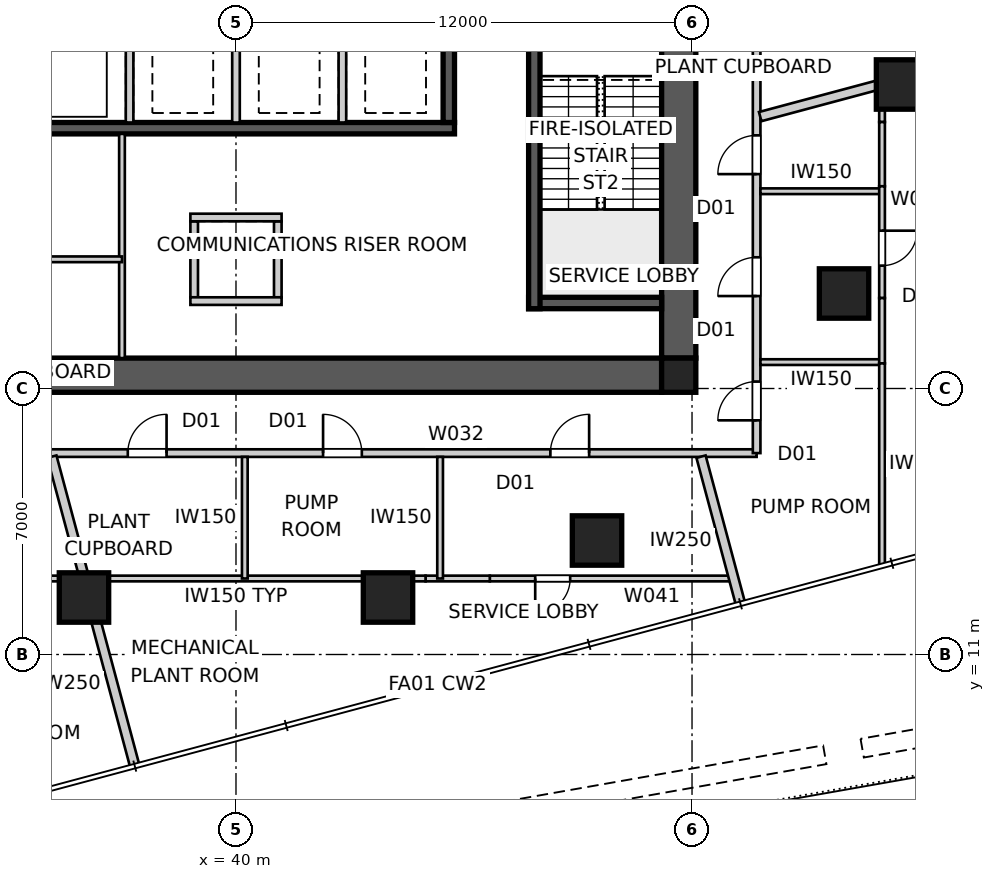
"""IFC4 building model, lengths in metres.
Left out: names, types, materials, properties, quantities, classifications, styles, units other than length and angle.
Written with IfcOpenShell. Run it as: python <this file> out.ifc"""

import sys

from ifc_helpers import new_model, si_unit, direction, frame, frame_2d, origin, origin_2d, place, context, subcontext, project, spatial, polyline, rectangle, outline, extrude, element, fill, save


model = new_model("IFC4")
c1 = context("Model", 3, precision=1e-05, world=origin(), true_north=direction((0.0, 1.0)))
c2 = subcontext(c1, "Body", "Model", "MODEL_VIEW")
j1 = project(units=[si_unit("LENGTHUNIT", "METRE"), si_unit("PLANEANGLEUNIT", "RADIAN")], contexts=[c1])
p1 = place(None, origin())
s1 = spatial("IfcSite", under=j1, at=p1, CompositionType="ELEMENT")
p2 = place(p1, origin())
s2 = spatial("IfcBuilding", under=s1, at=p2, CompositionType="ELEMENT")
p3 = place(p2, frame((0.0, 0.0, 106.6)))
s3 = spatial("IfcBuildingStorey", under=s2, at=p3, CompositionType="ELEMENT", Elevation=106.6)
p4 = place(p3, frame((51.2, 18.35, 0.0), z_axis=(0.0, 0.0, 1.0), x_axis=(-1.0, 0.0, 0.0)))
e1 = element("IfcWall", 1, at=p4, inside=s3, PredefinedType="SHEAR", context=c2, shape_type="SweptSolid", body=[
    extrude(outline(polyline([(0.0, -0.45), (22.4, -0.45), (22.4, -0.025), (22.85, -0.025), (22.85, 0.025), (22.4, 0.025), (22.4, 0.45), (0.0, 0.45), (0.0, 0.025), (-0.45, 0.025), (-0.45, -0.025), (0.0, -0.025), (0.0, -0.45)])), origin(), (0.0, 0.0, 1.0), 5.0),
])
p5 = place(p3, frame((51.65, 18.8, 0.0), z_axis=(0.0, 0.0, 1.0), x_axis=(0.0, 1.0, 0.0)))
e2 = element("IfcWall", 2, at=p5, inside=s3, PredefinedType="SHEAR", context=c2, shape_type="SweptSolid", body=[
    extrude(outline(polyline([(0.0, -0.45), (22.4, -0.45), (22.4, -0.025), (22.85, -0.025), (22.85, 0.025), (22.4, 0.025), (22.4, 0.45), (0.0, 0.45), (0.0, 0.025), (-0.45, 0.025), (-0.45, -0.025), (0.0, -0.025), (0.0, -0.45)])), origin(), (0.0, 0.0, 1.0), 5.0),
])
p6 = place(p5, frame((11.14, 0.0, 0.0)))
e3 = element("IfcOpeningElement", 3, at=p6, cuts=e2, PredefinedType="OPENING", context=c2, shape_type="SweptSolid", body=[
    extrude(rectangle(XDim=1.02, YDim=2.4, at=frame_2d((0.51, 1.2))), frame((0.0, 0.46, 0.0), z_axis=(0.0, -1.0, 0.0), x_axis=(1.0, 0.0, 0.0)), (0.0, 0.0, 1.0), 0.92),
])
p7 = place(p3, frame((45.75, 24.85, 0.0), z_axis=(0.0, 0.0, 1.0), x_axis=(-1.0, 0.0, 0.0)))
e4 = element("IfcWall", 4, at=p7, inside=s3, PredefinedType="SHEAR", context=c2, shape_type="SweptSolid", body=[
    extrude(rectangle(XDim=11.5, YDim=0.3, at=frame_2d((5.75, 0.0))), origin(), (0.0, 0.0, 1.0), 5.0),
])
p8 = place(p3, frame((45.6, 27.8, 0.0), z_axis=(0.0, 0.0, 1.0), x_axis=(0.0, -1.0, 0.0)))
e5 = element("IfcWall", 5, at=p8, inside=s3, PredefinedType="SHEAR", context=c2, shape_type="SweptSolid", body=[
    extrude(rectangle(XDim=2.8, YDim=0.3, at=frame_2d((1.4, 0.0))), origin(), (0.0, 0.0, 1.0), 5.0),
])
for number, where, z_axis, x_axis in (
    (6, (42.8, 27.8, 0.0), (0.0, 0.0, 1.0), (0.0, -1.0, 0.0)),
    (7, (40.0, 27.8, 0.0), (0.0, 0.0, 1.0), (0.0, -1.0, 0.0)),
    (8, (37.2, 27.8, 0.0), (0.0, 0.0, 1.0), (0.0, -1.0, 0.0)),
):
    element("IfcWall", number, at=place(p3, frame(where, z_axis=z_axis, x_axis=x_axis)), inside=s3, PredefinedType="SOLIDWALL", context=c2, shape_type="SweptSolid", body=[
        extrude(rectangle(XDim=2.8, YDim=0.2, at=frame_2d((1.4, 0.0))), origin(), (0.0, 0.0, 1.0), 5.0),
    ])
p9 = place(p3, frame((47.85, 27.8, 0.0), z_axis=(0.0, 0.0, 1.0), x_axis=(0.0, -1.0, 0.0)))
e9 = element("IfcWall", 9, at=p9, inside=s3, PredefinedType="SHEAR", context=c2, shape_type="SweptSolid", body=[
    extrude(rectangle(XDim=7.7, YDim=0.3, at=frame_2d((3.85, 0.0))), origin(), (0.0, 0.0, 1.0), 5.0),
])
p10 = place(p3, frame((51.2, 20.25, 0.0), z_axis=(0.0, 0.0, 1.0), x_axis=(-1.0, 0.0, 0.0)))
e10 = element("IfcWall", 10, at=p10, inside=s3, PredefinedType="SHEAR", context=c2, shape_type="SweptSolid", body=[
    extrude(rectangle(XDim=3.5, YDim=0.3, at=frame_2d((1.75, 0.0))), origin(), (0.0, 0.0, 1.0), 5.0),
])
for number, where, z_axis, x_axis in (
    (11, (38.9, 22.4, 0.0), (0.0, 0.0, 1.0), (0.0, -1.0, 0.0)),
    (12, (41.1, 22.4, 0.0), (0.0, 0.0, 1.0), (0.0, -1.0, 0.0)),
):
    element("IfcWall", number, at=place(p3, frame(where, z_axis=z_axis, x_axis=x_axis)), inside=s3, PredefinedType="SOLIDWALL", context=c2, shape_type="SweptSolid", body=[
        extrude(rectangle(XDim=2.0, YDim=0.2, at=frame_2d((1.0, 0.0))), origin(), (0.0, 0.0, 1.0), 5.0),
    ])
for number, where, z_axis, x_axis in (
    (13, (38.8, 22.5, 0.0), (0.0, 0.0, 1.0), (1.0, 0.0, 0.0)),
    (14, (38.8, 20.3, 0.0), (0.0, 0.0, 1.0), (1.0, 0.0, 0.0)),
):
    element("IfcWall", number, at=place(p3, frame(where, z_axis=z_axis, x_axis=x_axis)), inside=s3, PredefinedType="SOLIDWALL", context=c2, shape_type="SweptSolid", body=[
        extrude(rectangle(XDim=2.4, YDim=0.2, at=frame_2d((1.2, 0.0))), origin(), (0.0, 0.0, 1.0), 5.0),
    ])
p11 = place(p3, frame((51.65, 18.35, 0.0), z_axis=(0.0, 0.0, 1.0), x_axis=(1.0, 0.0, 0.0)))
e15 = element("IfcColumn", 15, at=p11, inside=s3, PredefinedType="COLUMN", context=c2, shape_type="SweptSolid", body=[
    extrude(rectangle(XDim=0.9, YDim=0.9, at=origin_2d()), origin(), (0.0, 0.0, 1.0), 5.0),
])
for number, where, z_axis, x_axis in (
    (16, (57.5, 26.0, 0.0), (0.0, 0.0, 1.0), (1.0, 0.0, 0.0)),
    (17, (36.0, 12.5, 0.0), (0.0, 0.0, 1.0), (1.0, 0.0, 0.0)),
    (18, (44.0, 12.5, 0.0), (0.0, 0.0, 1.0), (1.0, 0.0, 0.0)),
    (19, (49.5, 14.0, 0.0), (0.0, 0.0, 1.0), (1.0, 0.0, 0.0)),
    (20, (56.0, 20.5, 0.0), (0.0, 0.0, 1.0), (1.0, 0.0, 0.0)),
):
    element("IfcColumn", number, at=place(p3, frame(where, z_axis=z_axis, x_axis=x_axis)), inside=s3, PredefinedType="COLUMN", context=c2, shape_type="SweptSolid", body=[
        extrude(rectangle(XDim=1.3, YDim=1.3, at=origin_2d()), origin(), (0.0, 0.0, 1.0), 5.0),
    ])
p12 = place(p3, frame((26.3, 16.3, 0.0), z_axis=(0.0, 0.0, 1.0), x_axis=(1.0, 0.0, 0.0)))
e21 = element("IfcWall", 21, at=p12, inside=s3, PredefinedType="PARTITIONING", context=c2, shape_type="SweptSolid", body=[
    extrude(rectangle(XDim=27.4, YDim=0.2, at=frame_2d((13.7, 0.0))), origin(), (0.0, 0.0, 1.0), 4.85),
])
p13 = place(p12, frame((21.972, 0.0, 0.0)))
e22 = element("IfcOpeningElement", 22, at=p13, cuts=e21, PredefinedType="OPENING", context=c2, shape_type="SweptSolid", body=[
    extrude(rectangle(XDim=1.02, YDim=2.34, at=frame_2d((0.51, 1.17))), frame((0.0, 0.11, 0.0), z_axis=(0.0, -1.0, 0.0), x_axis=(1.0, 0.0, 0.0)), (0.0, 0.0, 1.0), 0.22),
])
p14 = place(p12, frame((15.991, 0.0, 0.0)))
e23 = element("IfcOpeningElement", 23, at=p14, cuts=e21, PredefinedType="OPENING", context=c2, shape_type="SweptSolid", body=[
    extrude(rectangle(XDim=1.02, YDim=2.34, at=frame_2d((0.51, 1.17))), frame((0.0, 0.11, 0.0), z_axis=(0.0, -1.0, 0.0), x_axis=(1.0, 0.0, 0.0)), (0.0, 0.0, 1.0), 0.22),
])
p15 = place(p12, frame((10.853, 0.0, 0.0)))
e24 = element("IfcOpeningElement", 24, at=p15, cuts=e21, PredefinedType="OPENING", context=c2, shape_type="SweptSolid", body=[
    extrude(rectangle(XDim=1.02, YDim=2.34, at=frame_2d((0.51, 1.17))), frame((0.0, 0.11, 0.0), z_axis=(0.0, -1.0, 0.0), x_axis=(1.0, 0.0, 0.0)), (0.0, 0.0, 1.0), 0.22),
])
p16 = place(p12, frame((4.133, 0.0, 0.0)))
e25 = element("IfcOpeningElement", 25, at=p16, cuts=e21, PredefinedType="OPENING", context=c2, shape_type="SweptSolid", body=[
    extrude(rectangle(XDim=1.02, YDim=2.34, at=frame_2d((0.51, 1.17))), frame((0.0, 0.11, 0.0), z_axis=(0.0, -1.0, 0.0), x_axis=(1.0, 0.0, 0.0)), (0.0, 0.0, 1.0), 0.22),
])
p17 = place(p12, frame((0.862, 0.0, 0.0)))
e26 = element("IfcOpeningElement", 26, at=p17, cuts=e21, PredefinedType="OPENING", context=c2, shape_type="SweptSolid", body=[
    extrude(rectangle(XDim=1.02, YDim=2.34, at=frame_2d((0.51, 1.17))), frame((0.0, 0.11, 0.0), z_axis=(0.0, -1.0, 0.0), x_axis=(1.0, 0.0, 0.0)), (0.0, 0.0, 1.0), 0.22),
])
p18 = place(p12, frame((7.342, 0.0, 0.0)))
e27 = element("IfcOpeningElement", 27, at=p18, cuts=e21, PredefinedType="OPENING", context=c2, shape_type="SweptSolid", body=[
    extrude(rectangle(XDim=1.02, YDim=2.34, at=frame_2d((0.51, 1.17))), frame((0.0, 0.11, 0.0), z_axis=(0.0, -1.0, 0.0), x_axis=(1.0, 0.0, 0.0)), (0.0, 0.0, 1.0), 0.22),
])
p19 = place(p3, frame((53.7, 16.3, 0.0), z_axis=(0.0, 0.0, 1.0), x_axis=(0.0, 1.0, 0.0)))
e28 = element("IfcWall", 28, at=p19, inside=s3, PredefinedType="PARTITIONING", context=c2, shape_type="SweptSolid", body=[
    extrude(rectangle(XDim=27.4, YDim=0.2, at=frame_2d((13.7, 0.0))), origin(), (0.0, 0.0, 1.0), 4.85),
])
p20 = place(p19, frame((21.421, 0.0, 0.0)))
e29 = element("IfcOpeningElement", 29, at=p20, cuts=e28, PredefinedType="OPENING", context=c2, shape_type="SweptSolid", body=[
    extrude(rectangle(XDim=1.02, YDim=2.34, at=frame_2d((0.51, 1.17))), frame((0.0, 0.11, 0.0), z_axis=(0.0, -1.0, 0.0), x_axis=(1.0, 0.0, 0.0)), (0.0, 0.0, 1.0), 0.22),
])
p21 = place(p19, frame((12.293, 0.0, 0.0)))
e30 = element("IfcOpeningElement", 30, at=p21, cuts=e28, PredefinedType="OPENING", context=c2, shape_type="SweptSolid", body=[
    extrude(rectangle(XDim=1.02, YDim=2.34, at=frame_2d((0.51, 1.17))), frame((0.0, 0.11, 0.0), z_axis=(0.0, -1.0, 0.0), x_axis=(1.0, 0.0, 0.0)), (0.0, 0.0, 1.0), 0.22),
])
p22 = place(p19, frame((4.133, 0.0, 0.0)))
e31 = element("IfcOpeningElement", 31, at=p22, cuts=e28, PredefinedType="OPENING", context=c2, shape_type="SweptSolid", body=[
    extrude(rectangle(XDim=1.02, YDim=2.34, at=frame_2d((0.51, 1.17))), frame((0.0, 0.11, 0.0), z_axis=(0.0, -1.0, 0.0), x_axis=(1.0, 0.0, 0.0)), (0.0, 0.0, 1.0), 0.22),
])
p23 = place(p19, frame((0.862, 0.0, 0.0)))
e32 = element("IfcOpeningElement", 32, at=p23, cuts=e28, PredefinedType="OPENING", context=c2, shape_type="SweptSolid", body=[
    extrude(rectangle(XDim=1.02, YDim=2.34, at=frame_2d((0.51, 1.17))), frame((0.0, 0.11, 0.0), z_axis=(0.0, -1.0, 0.0), x_axis=(1.0, 0.0, 0.0)), (0.0, 0.0, 1.0), 0.22),
])
p24 = place(p19, frame((7.342, 0.0, 0.0)))
e33 = element("IfcOpeningElement", 33, at=p24, cuts=e28, PredefinedType="OPENING", context=c2, shape_type="SweptSolid", body=[
    extrude(rectangle(XDim=1.02, YDim=2.34, at=frame_2d((0.51, 1.17))), frame((0.0, 0.11, 0.0), z_axis=(0.0, -1.0, 0.0), x_axis=(1.0, 0.0, 0.0)), (0.0, 0.0, 1.0), 0.22),
])
p25 = place(p3, frame((37.337, 8.063, 0.0), z_axis=(0.0, 0.0, 1.0), x_axis=(-0.25881425273, 0.965927110389, 0.0)))
e34 = element("IfcWall", 34, at=p25, inside=s3, PredefinedType="PARTITIONING", context=c2, shape_type="SweptSolid", body=[
    extrude(rectangle(XDim=8.43, YDim=0.25, at=frame_2d((4.215, 0.0))), origin(), (0.0, 0.0, 1.0), 4.85),
])
p26 = place(p3, frame((53.275, 12.334, 0.0), z_axis=(0.0, 0.0, 1.0), x_axis=(-0.258807108475, 0.96592902462, 0.0)))
e35 = element("IfcWall", 35, at=p26, inside=s3, PredefinedType="PARTITIONING", context=c2, shape_type="SweptSolid", body=[
    extrude(rectangle(XDim=4.009, YDim=0.25, at=frame_2d((2.004, 0.0))), origin(), (0.0, 0.0, 1.0), 4.85),
])
p27 = place(p3, frame((61.937, 27.337, 0.0), z_axis=(0.0, 0.0, 1.0), x_axis=(-0.965927110389, -0.25881425273, 0.0)))
e36 = element("IfcWall", 36, at=p27, inside=s3, PredefinedType="PARTITIONING", context=c2, shape_type="SweptSolid", body=[
    extrude(rectangle(XDim=8.43, YDim=0.25, at=frame_2d((4.215, 0.0))), origin(), (0.0, 0.0, 1.0), 4.85),
])
p28 = place(p3, frame((37.0, 18.8, 0.0), z_axis=(0.0, 0.0, 1.0), x_axis=(0.0, 1.0, 0.0)))
e37 = element("IfcWall", 37, at=p28, inside=s3, PredefinedType="SOLIDWALL", context=c2, shape_type="SweptSolid", body=[
    extrude(rectangle(XDim=5.9, YDim=0.15, at=frame_2d((2.95, 0.0))), origin(), (0.0, 0.0, 1.0), 4.85),
])
p29 = place(p3, frame((37.0, 21.4, 0.0), z_axis=(0.0, 0.0, 1.0), x_axis=(-1.0, 0.0, 0.0)))
e38 = element("IfcWall", 38, at=p29, inside=s3, PredefinedType="SOLIDWALL", context=c2, shape_type="SweptSolid", body=[
    extrude(rectangle(XDim=8.2, YDim=0.15, at=frame_2d((4.1, 0.0))), origin(), (0.0, 0.0, 1.0), 4.85),
])
p30 = place(p29, frame((3.64, 0.0, 0.0)))
e39 = element("IfcOpeningElement", 39, at=p30, cuts=e38, PredefinedType="OPENING", context=c2, shape_type="SweptSolid", body=[
    extrude(rectangle(XDim=0.92, YDim=2.1, at=frame_2d((0.46, 1.05))), frame((0.0, 0.085, 0.0), z_axis=(0.0, -1.0, 0.0), x_axis=(1.0, 0.0, 0.0)), (0.0, 0.0, 1.0), 0.17),
])
p31 = place(p3, frame((53.096, 13.0, 0.0), z_axis=(0.0, 0.0, 1.0), x_axis=(-1.0, 0.0, 0.0)))
e40 = element("IfcWall", 40, at=p31, inside=s3, PredefinedType="SOLIDWALL", context=c2, shape_type="SweptSolid", body=[
    extrude(rectangle(XDim=6.418, YDim=0.15, at=frame_2d((3.209, 0.0))), origin(), (0.0, 0.0, 1.0), 4.85),
])
p32 = place(p31, frame((4.302, 0.0, 0.0)))
e41 = element("IfcOpeningElement", 41, at=p32, cuts=e40, PredefinedType="OPENING", context=c2, shape_type="SweptSolid", body=[
    extrude(rectangle(XDim=0.92, YDim=2.1, at=frame_2d((0.46, 1.05))), frame((0.0, 0.085, 0.0), z_axis=(0.0, -1.0, 0.0), x_axis=(1.0, 0.0, 0.0)), (0.0, 0.0, 1.0), 0.17),
])
p33 = place(p3, frame((46.678, 13.0, 0.0), z_axis=(0.0, 0.0, 1.0), x_axis=(-1.0, 0.0, 0.0)))
e42 = element("IfcWall", 42, at=p33, inside=s3, PredefinedType="SOLIDWALL", context=c2, shape_type="SweptSolid", body=[
    extrude(rectangle(XDim=1.69, YDim=0.15, at=frame_2d((0.845, 0.0))), origin(), (0.0, 0.0, 1.0), 3.85),
])
p34 = place(p3, frame((44.988, 13.0, 0.0), z_axis=(0.0, 0.0, 1.0), x_axis=(-1.0, 0.0, 0.0)))
e43 = element("IfcWall", 43, at=p34, inside=s3, PredefinedType="SOLIDWALL", context=c2, shape_type="SweptSolid", body=[
    extrude(rectangle(XDim=9.977, YDim=0.15, at=frame_2d((4.988, 0.0))), origin(), (0.0, 0.0, 1.0), 4.85),
])
for number, where, z_axis, x_axis in (
    (44, (45.371, 13.0, 0.0), (0.0, 0.0, 1.0), (0.0, 1.0, 0.0)),
    (45, (40.232, 13.0, 0.0), (0.0, 0.0, 1.0), (0.0, 1.0, 0.0)),
    (46, (57.0, 18.695, 0.0), (0.0, 0.0, 1.0), (-1.0, 0.0, 0.0)),
    (47, (53.8, 23.191, 0.0), (0.0, 0.0, 1.0), (1.0, 0.0, 0.0)),
):
    element("IfcWall", number, at=place(p3, frame(where, z_axis=z_axis, x_axis=x_axis)), inside=s3, PredefinedType="SOLIDWALL", context=c2, shape_type="SweptSolid", body=[
        extrude(rectangle(XDim=3.2, YDim=0.15, at=frame_2d((1.6, 0.0))), origin(), (0.0, 0.0, 1.0), 4.85),
    ])
p35 = place(p3, frame((57.0, 26.014, 0.0), z_axis=(0.0, 0.0, 1.0), x_axis=(0.0, -1.0, 0.0)))
e48 = element("IfcWall", 48, at=p35, inside=s3, PredefinedType="SOLIDWALL", context=c2, shape_type="SweptSolid", body=[
    extrude(rectangle(XDim=1.002, YDim=0.15, at=frame_2d((0.501, 0.0))), origin(), (0.0, 0.0, 1.0), 4.85),
])
p36 = place(p3, frame((57.0, 25.012, 0.0), z_axis=(0.0, 0.0, 1.0), x_axis=(0.0, -1.0, 0.0)))
e49 = element("IfcWall", 49, at=p36, inside=s3, PredefinedType="SOLIDWALL", context=c2, shape_type="SweptSolid", body=[
    extrude(rectangle(XDim=1.69, YDim=0.15, at=frame_2d((0.845, 0.0))), origin(), (0.0, 0.0, 1.0), 3.85),
])
p37 = place(p3, frame((57.0, 23.322, 0.0), z_axis=(0.0, 0.0, 1.0), x_axis=(0.0, -1.0, 0.0)))
e50 = element("IfcWall", 50, at=p37, inside=s3, PredefinedType="SOLIDWALL", context=c2, shape_type="SweptSolid", body=[
    extrude(rectangle(XDim=2.942, YDim=0.15, at=frame_2d((1.471, 0.0))), origin(), (0.0, 0.0, 1.0), 4.85),
])
p38 = place(p37, frame((1.169, 0.0, 0.0)))
e51 = element("IfcOpeningElement", 51, at=p38, cuts=e50, PredefinedType="OPENING", context=c2, shape_type="SweptSolid", body=[
    extrude(rectangle(XDim=0.92, YDim=2.1, at=frame_2d((0.46, 1.05))), frame((0.0, 0.085, 0.0), z_axis=(0.0, -1.0, 0.0), x_axis=(1.0, 0.0, 0.0)), (0.0, 0.0, 1.0), 0.17),
])
p39 = place(p3, frame((57.0, 20.38, 0.0), z_axis=(0.0, 0.0, 1.0), x_axis=(0.0, -1.0, 0.0)))
e52 = element("IfcWall", 52, at=p39, inside=s3, PredefinedType="SOLIDWALL", context=c2, shape_type="SweptSolid", body=[
    extrude(rectangle(XDim=1.719, YDim=0.15, at=frame_2d((0.859, 0.0))), origin(), (0.0, 0.0, 1.0), 4.049),
])
p40 = place(p3, frame((57.0, 18.661, 0.0), z_axis=(0.0, 0.0, 1.0), x_axis=(0.0, -1.0, 0.0)))
e53 = element("IfcWall", 53, at=p40, inside=s3, PredefinedType="SOLIDWALL", context=c2, shape_type="SweptSolid", body=[
    extrude(rectangle(XDim=5.287, YDim=0.15, at=frame_2d((2.644, 0.0))), origin(), (0.0, 0.0, 1.0), 4.85),
])
p41 = place(p13, origin())
e54 = element("IfcDoor", 54, at=p41, inside=s3, OperationType="SINGLE_SWING_RIGHT", PredefinedType="DOOR", context=c2, shape_type="SweptSolid", body=[
    extrude(rectangle(XDim=1.02, YDim=2.34, at=frame_2d((0.51, 1.17))), frame((0.0, 0.025, 0.0), z_axis=(0.0, -1.0, 0.0), x_axis=(1.0, 0.0, 0.0)), (0.0, 0.0, 1.0), 0.05),
])
fill(e22, e54)
p42 = place(p14, origin())
e55 = element("IfcDoor", 55, at=p42, inside=s3, OperationType="SINGLE_SWING_LEFT", PredefinedType="DOOR", context=c2, shape_type="SweptSolid", body=[
    extrude(rectangle(XDim=1.02, YDim=2.34, at=frame_2d((0.51, 1.17))), frame((0.0, 0.025, 0.0), z_axis=(0.0, -1.0, 0.0), x_axis=(1.0, 0.0, 0.0)), (0.0, 0.0, 1.0), 0.05),
])
fill(e23, e55)
p43 = place(p15, origin())
e56 = element("IfcDoor", 56, at=p43, inside=s3, OperationType="SINGLE_SWING_RIGHT", PredefinedType="DOOR", context=c2, shape_type="SweptSolid", body=[
    extrude(rectangle(XDim=1.02, YDim=2.34, at=frame_2d((0.51, 1.17))), frame((0.0, 0.025, 0.0), z_axis=(0.0, -1.0, 0.0), x_axis=(1.0, 0.0, 0.0)), (0.0, 0.0, 1.0), 0.05),
])
fill(e24, e56)
p44 = place(p22, origin())
e57 = element("IfcDoor", 57, at=p44, inside=s3, OperationType="SINGLE_SWING_LEFT", PredefinedType="DOOR", context=c2, shape_type="SweptSolid", body=[
    extrude(rectangle(XDim=1.02, YDim=2.34, at=frame_2d((0.51, 1.17))), frame((0.0, 0.025, 0.0), z_axis=(0.0, -1.0, 0.0), x_axis=(1.0, 0.0, 0.0)), (0.0, 0.0, 1.0), 0.05),
])
fill(e31, e57)
p45 = place(p23, origin())
e58 = element("IfcDoor", 58, at=p45, inside=s3, OperationType="SINGLE_SWING_LEFT", PredefinedType="DOOR", context=c2, shape_type="SweptSolid", body=[
    extrude(rectangle(XDim=1.02, YDim=2.34, at=frame_2d((0.51, 1.17))), frame((0.0, 0.025, 0.0), z_axis=(0.0, -1.0, 0.0), x_axis=(1.0, 0.0, 0.0)), (0.0, 0.0, 1.0), 0.05),
])
fill(e32, e58)
p46 = place(p24, origin())
e59 = element("IfcDoor", 59, at=p46, inside=s3, OperationType="SINGLE_SWING_LEFT", PredefinedType="DOOR", context=c2, shape_type="SweptSolid", body=[
    extrude(rectangle(XDim=1.02, YDim=2.34, at=frame_2d((0.51, 1.17))), frame((0.0, 0.025, 0.0), z_axis=(0.0, -1.0, 0.0), x_axis=(1.0, 0.0, 0.0)), (0.0, 0.0, 1.0), 0.05),
])
fill(e33, e59)
p47 = place(p32, origin())
e60 = element("IfcDoor", 60, at=p47, inside=s3, OperationType="SINGLE_SWING_RIGHT", PredefinedType="DOOR", context=c2, shape_type="SweptSolid", body=[
    extrude(rectangle(XDim=0.92, YDim=2.1, at=frame_2d((0.46, 1.05))), frame((0.0, 0.025, 0.0), z_axis=(0.0, -1.0, 0.0), x_axis=(1.0, 0.0, 0.0)), (0.0, 0.0, 1.0), 0.05),
])
fill(e41, e60)
p48 = place(p38, origin())
e61 = element("IfcDoor", 61, at=p48, inside=s3, OperationType="SINGLE_SWING_LEFT", PredefinedType="DOOR", context=c2, shape_type="SweptSolid", body=[
    extrude(rectangle(XDim=0.92, YDim=2.1, at=frame_2d((0.46, 1.05))), frame((0.0, 0.025, 0.0), z_axis=(0.0, -1.0, 0.0), x_axis=(1.0, 0.0, 0.0)), (0.0, 0.0, 1.0), 0.05),
])
fill(e51, e61)
save(model, sys.argv[1])
